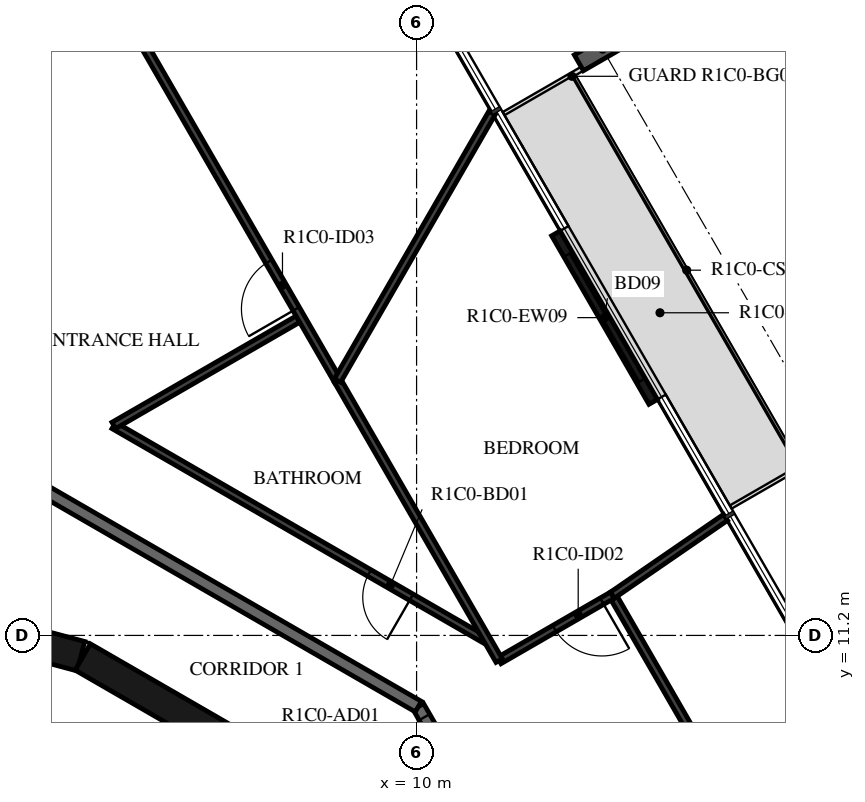
"""IFC4 building model, lengths in metres.
Left out: names, types, materials, properties, quantities, classifications, styles, units other than length and angle.
Written with IfcOpenShell. Run it as: python <this file> out.ifc"""

import sys

from ifc_helpers import new_model, si_unit, direction, frame, frame_2d, origin, origin_2d, place, context, subcontext, project, spatial, rectangle, i_section, extrude, element, fill, save


model = new_model("IFC4")
c1 = context("Model", 3, precision=1e-05, world=origin(), true_north=direction((0.0, 1.0)))
c2 = subcontext(c1, "Body", "Model", "MODEL_VIEW")
j1 = project(units=[si_unit("LENGTHUNIT", "METRE"), si_unit("PLANEANGLEUNIT", "RADIAN")], contexts=[c1])
p1 = place(None, origin())
s1 = spatial("IfcSite", under=j1, at=p1, CompositionType="ELEMENT")
p2 = place(p1, origin())
s2 = spatial("IfcBuilding", under=s1, at=p2, CompositionType="ELEMENT")
p3 = place(p2, frame((0.0, 0.0, 66.4)))
s3 = spatial("IfcBuildingStorey", under=s2, at=p3, CompositionType="ELEMENT", Elevation=66.4)
p4 = place(p3, frame((13.059, 20.842, -0.38), z_axis=(0.0, 0.0, 1.0), x_axis=(0.50000017485, -0.866025302835, 0.0)))
e1 = element("IfcColumn", 1, at=p4, inside=s3, PredefinedType="COLUMN", context=c2, shape_type="SweptSolid", body=[
    extrude(i_section(OverallWidth=0.3, OverallDepth=0.9, WebThickness=0.019, FlangeThickness=0.035, FilletRadius=0.03, at=origin_2d()), origin(), (0.0, 0.0, 1.0), 2.616),
])
p5 = place(p3, frame((13.891, 15.041, 0.0), z_axis=(0.0, 0.0, 1.0), x_axis=(-0.499971222258, 0.866042017984, 0.0)))
e2 = element("IfcWall", 2, at=p5, inside=s3, PredefinedType="STANDARD", context=c2, shape_type="SweptSolid", body=[
    extrude(rectangle(XDim=3.2, YDim=0.16, at=frame_2d((1.6, 0.0))), origin(), (0.0, 0.0, 1.0), 3.05),
])
p6 = place(p5, frame((0.4, 0.0, 0.0)))
e3 = element("IfcOpeningElement", 3, at=p6, cuts=e2, PredefinedType="OPENING", context=c2, shape_type="SweptSolid", body=[
    extrude(rectangle(XDim=2.4, YDim=2.4, at=frame_2d((1.2, 1.2))), frame((0.0, 0.09, 0.0), z_axis=(0.0, -1.0, 0.0), x_axis=(1.0, 0.0, 0.0)), (0.0, 0.0, 1.0), 0.18),
])
p7 = place(p3, frame((7.137, 9.329, 0.0), z_axis=(0.0, 0.0, 1.0), x_axis=(-0.865975092491, 0.500087131594, 0.0)))
e4 = element("IfcWall", 4, at=p7, inside=s3, PredefinedType="SHEAR", context=c2, shape_type="SweptSolid", body=[
    extrude(rectangle(XDim=3.033, YDim=0.5, at=frame_2d((1.516, 0.0))), origin(), (0.0, 0.0, 1.0), 3.05),
])
p8 = place(p3, frame((4.479, 10.858, 0.0), z_axis=(0.0, 0.0, 1.0), x_axis=(-0.965948410781, 0.258734743916, 0.0)))
e5 = element("IfcWall", 5, at=p8, inside=s3, PredefinedType="SHEAR", context=c2, shape_type="SweptSolid", body=[
    extrude(rectangle(XDim=3.033, YDim=0.5, at=frame_2d((1.516, 0.0))), origin(), (0.0, 0.0, 1.0), 3.05),
])
p9 = place(p8, frame((1.066, 0.0, 0.0)))
e6 = element("IfcOpeningElement", 6, at=p9, cuts=e5, PredefinedType="OPENING", context=c2, shape_type="SweptSolid", body=[
    extrude(rectangle(XDim=0.9, YDim=2.1, at=frame_2d((0.45, 1.05))), frame((0.0, 0.26, 0.0), z_axis=(0.0, -1.0, 0.0), x_axis=(1.0, 0.0, 0.0)), (0.0, 0.0, 1.0), 0.52),
])
p10 = place(p3, frame((13.7, 3.671, 0.0), z_axis=(0.0, 0.0, 1.0), x_axis=(-0.500001669485, 0.866024439905, 0.0)))
e7 = element("IfcWall", 7, at=p10, inside=s3, PredefinedType="STANDARD", context=c2, shape_type="SweptSolid", body=[
    extrude(rectangle(XDim=7.342, YDim=0.2, at=frame_2d((3.671, 0.0))), origin(), (0.0, 0.0, 1.0), 3.05),
])
p11 = place(p10, frame((6.142, 0.0, 0.0)))
e8 = element("IfcOpeningElement", 8, at=p11, cuts=e7, PredefinedType="OPENING", context=c2, shape_type="SweptSolid", body=[
    extrude(rectangle(XDim=1.0, YDim=2.1, at=frame_2d((0.5, 1.05))), frame((0.0, 0.11, 0.0), z_axis=(0.0, -1.0, 0.0), x_axis=(1.0, 0.0, 0.0)), (0.0, 0.0, 1.0), 0.22),
])
p12 = place(p3, frame((10.029, 10.029, 0.0), z_axis=(0.0, 0.0, 1.0), x_axis=(-0.866024439905, 0.500001669485, 0.0)))
e9 = element("IfcWall", 9, at=p12, inside=s3, PredefinedType="STANDARD", context=c2, shape_type="SweptSolid", body=[
    extrude(rectangle(XDim=7.342, YDim=0.2, at=frame_2d((3.671, 0.0))), origin(), (0.0, 0.0, 1.0), 3.05),
])
p13 = place(p3, frame((14.471, 9.697, 0.0), z_axis=(0.0, 0.0, 1.0), x_axis=(-0.500004234368, 0.866022959057, 0.0)))
e10 = element("IfcWall", 10, at=p13, inside=s3, PredefinedType="PARTITIONING", context=c2, shape_type="SweptSolid", body=[
    extrude(rectangle(XDim=2.5, YDim=0.12, at=frame_2d((1.25, 0.0))), origin(), (0.0, 0.0, 1.0), 3.05),
])
p14 = place(p3, frame((13.221, 11.862, 0.0), z_axis=(0.0, 0.0, 1.0), x_axis=(-0.866055151781, -0.499948471418, 0.0)))
e11 = element("IfcWall", 11, at=p14, inside=s3, PredefinedType="PARTITIONING", context=c2, shape_type="SweptSolid", body=[
    extrude(rectangle(XDim=2.151, YDim=0.12, at=frame_2d((1.075, 0.0))), origin(), (0.0, 0.0, 1.0), 3.05),
])
p15 = place(p14, frame((0.2, 0.0, 0.0)))
e12 = element("IfcOpeningElement", 12, at=p15, cuts=e11, PredefinedType="OPENING", context=c2, shape_type="SweptSolid", body=[
    extrude(rectangle(XDim=0.9, YDim=2.1, at=frame_2d((0.45, 1.05))), frame((0.0, 0.07, 0.0), z_axis=(0.0, -1.0, 0.0), x_axis=(1.0, 0.0, 0.0)), (0.0, 0.0, 1.0), 0.14),
])
p16 = place(p3, frame((11.127, 11.127, 0.0), z_axis=(0.0, 0.0, 1.0), x_axis=(-0.86602299963, 0.500004164094, 0.0)))
e13 = element("IfcWall", 13, at=p16, inside=s3, PredefinedType="PARTITIONING", context=c2, shape_type="SweptSolid", body=[
    extrude(rectangle(XDim=7.052, YDim=0.12, at=frame_2d((3.526, 0.0))), origin(), (0.0, 0.0, 1.0), 3.05),
])
p17 = place(p16, frame((1.4, 0.0, 0.0)))
e14 = element("IfcOpeningElement", 14, at=p17, cuts=e13, PredefinedType="OPENING", context=c2, shape_type="SweptSolid", body=[
    extrude(rectangle(XDim=0.8, YDim=2.1, at=frame_2d((0.4, 1.05))), frame((0.0, 0.07, 0.0), z_axis=(0.0, -1.0, 0.0), x_axis=(1.0, 0.0, 0.0)), (0.0, 0.0, 1.0), 0.14),
])
p18 = place(p3, frame((5.02, 14.653, 0.0), z_axis=(0.0, 0.0, 1.0), x_axis=(0.866028940167, 0.499993874756, 0.0)))
e15 = element("IfcWall", 15, at=p18, inside=s3, PredefinedType="PARTITIONING", context=c2, shape_type="SweptSolid", body=[
    extrude(rectangle(XDim=3.556, YDim=0.12, at=frame_2d((1.778, 0.0))), origin(), (0.0, 0.0, 1.0), 3.05),
])
p19 = place(p3, frame((8.7, 15.392, 0.0), z_axis=(0.0, 0.0, 1.0), x_axis=(-0.500002742713, 0.866023820272, 0.0)))
e16 = element("IfcWall", 16, at=p19, inside=s3, PredefinedType="PARTITIONING", context=c2, shape_type="SweptSolid", body=[
    extrude(rectangle(XDim=10.908, YDim=0.12, at=frame_2d((5.454, 0.0))), origin(), (0.0, 0.0, 1.0), 3.05),
])
p20 = place(p19, frame((1.36, 0.0, 0.0)))
e17 = element("IfcOpeningElement", 17, at=p20, cuts=e16, PredefinedType="OPENING", context=c2, shape_type="SweptSolid", body=[
    extrude(rectangle(XDim=0.9, YDim=2.1, at=frame_2d((0.45, 1.05))), frame((0.0, 0.07, 0.0), z_axis=(0.0, -1.0, 0.0), x_axis=(1.0, 0.0, 0.0)), (0.0, 0.0, 1.0), 0.14),
])
p21 = place(p19, frame((8.317, 0.0, 0.0)))
e18 = element("IfcOpeningElement", 18, at=p21, cuts=e16, PredefinedType="OPENING", context=c2, shape_type="SweptSolid", body=[
    extrude(rectangle(XDim=0.9, YDim=2.1, at=frame_2d((0.45, 1.05))), frame((0.0, 0.07, 0.0), z_axis=(0.0, -1.0, 0.0), x_axis=(1.0, 0.0, 0.0)), (0.0, 0.0, 1.0), 0.14),
])
p22 = place(p3, frame((4.841, 22.075, 0.0), z_axis=(0.0, 0.0, 1.0), x_axis=(-0.866019751484, -0.500009789943, 0.0)))
e19 = element("IfcWall", 19, at=p22, inside=s3, PredefinedType="PARTITIONING", context=c2, shape_type="SweptSolid", body=[
    extrude(rectangle(XDim=5.59, YDim=0.12, at=frame_2d((2.795, 0.0))), origin(), (0.0, 0.0, 1.0), 3.05),
])
p23 = place(p22, frame((0.2, 0.0, 0.0)))
e20 = element("IfcOpeningElement", 20, at=p23, cuts=e19, PredefinedType="OPENING", context=c2, shape_type="SweptSolid", body=[
    extrude(rectangle(XDim=0.9, YDim=2.1, at=frame_2d((0.45, 1.05))), frame((0.0, 0.07, 0.0), z_axis=(0.0, -1.0, 0.0), x_axis=(1.0, 0.0, 0.0)), (0.0, 0.0, 1.0), 0.14),
])
p24 = place(p3, frame((15.08, 13.14, 0.0), z_axis=(0.0, 0.0, 1.0), x_axis=(-0.824041924199, -0.566528822887, 0.0)))
e21 = element("IfcWall", 21, at=p24, inside=s3, PredefinedType="PARTITIONING", context=c2, shape_type="SweptSolid", body=[
    extrude(rectangle(XDim=2.256, YDim=0.12, at=frame_2d((1.128, 0.0))), origin(), (0.0, 0.0, 1.0), 3.05),
])
p25 = place(p3, frame((8.7, 15.392, 0.0), z_axis=(0.0, 0.0, 1.0), x_axis=(0.499986106925, -0.866033424806, 0.0)))
e22 = element("IfcWall", 22, at=p25, inside=s3, PredefinedType="PARTITIONING", context=c2, shape_type="SweptSolid", body=[
    extrude(rectangle(XDim=5.317, YDim=0.12, at=frame_2d((2.659, 0.0))), origin(), (0.0, 0.0, 1.0), 3.05),
])
p26 = place(p3, frame((11.24, 19.792, 0.0), z_axis=(0.0, 0.0, 1.0), x_axis=(-0.499978956711, -0.866037552792, 0.0)))
e23 = element("IfcWall", 23, at=p26, inside=s3, PredefinedType="PARTITIONING", context=c2, shape_type="SweptSolid", body=[
    extrude(rectangle(XDim=5.081, YDim=0.12, at=frame_2d((2.541, 0.0))), origin(), (0.0, 0.0, 1.0), 3.05),
])
p27 = place(p6, origin())
e24 = element("IfcDoor", 24, at=p27, inside=s3, OperationType="DOUBLE_DOOR_SLIDING", PredefinedType="DOOR", context=c2, shape_type="SweptSolid", body=[
    extrude(rectangle(XDim=2.4, YDim=2.4, at=frame_2d((1.2, 1.2))), frame((0.0, 0.025, 0.0), z_axis=(0.0, -1.0, 0.0), x_axis=(1.0, 0.0, 0.0)), (0.0, 0.0, 1.0), 0.05),
])
fill(e3, e24)
p28 = place(p11, origin())
e25 = element("IfcDoor", 25, at=p28, inside=s3, OperationType="SINGLE_SWING_RIGHT", PredefinedType="DOOR", context=c2, shape_type="SweptSolid", body=[
    extrude(rectangle(XDim=1.0, YDim=2.1, at=frame_2d((0.5, 1.05))), frame((0.0, 0.025, 0.0), z_axis=(0.0, -1.0, 0.0), x_axis=(1.0, 0.0, 0.0)), (0.0, 0.0, 1.0), 0.05),
])
fill(e8, e25)
p29 = place(p15, origin())
e26 = element("IfcDoor", 26, at=p29, inside=s3, OperationType="SINGLE_SWING_RIGHT", PredefinedType="DOOR", context=c2, shape_type="SweptSolid", body=[
    extrude(rectangle(XDim=0.9, YDim=2.1, at=frame_2d((0.45, 1.05))), frame((0.0, 0.025, 0.0), z_axis=(0.0, -1.0, 0.0), x_axis=(1.0, 0.0, 0.0)), (0.0, 0.0, 1.0), 0.05),
])
fill(e12, e26)
p30 = place(p17, origin())
e27 = element("IfcDoor", 27, at=p30, inside=s3, OperationType="SINGLE_SWING_RIGHT", PredefinedType="DOOR", context=c2, shape_type="SweptSolid", body=[
    extrude(rectangle(XDim=0.8, YDim=2.1, at=frame_2d((0.4, 1.05))), frame((0.0, 0.025, 0.0), z_axis=(0.0, -1.0, 0.0), x_axis=(1.0, 0.0, 0.0)), (0.0, 0.0, 1.0), 0.05),
])
fill(e14, e27)
p31 = place(p20, origin())
e28 = element("IfcDoor", 28, at=p31, inside=s3, OperationType="SINGLE_SWING_RIGHT", PredefinedType="DOOR", context=c2, shape_type="SweptSolid", body=[
    extrude(rectangle(XDim=0.9, YDim=2.1, at=frame_2d((0.45, 1.05))), frame((0.0, 0.025, 0.0), z_axis=(0.0, -1.0, 0.0), x_axis=(1.0, 0.0, 0.0)), (0.0, 0.0, 1.0), 0.05),
])
fill(e17, e28)
save(model, sys.argv[1])
